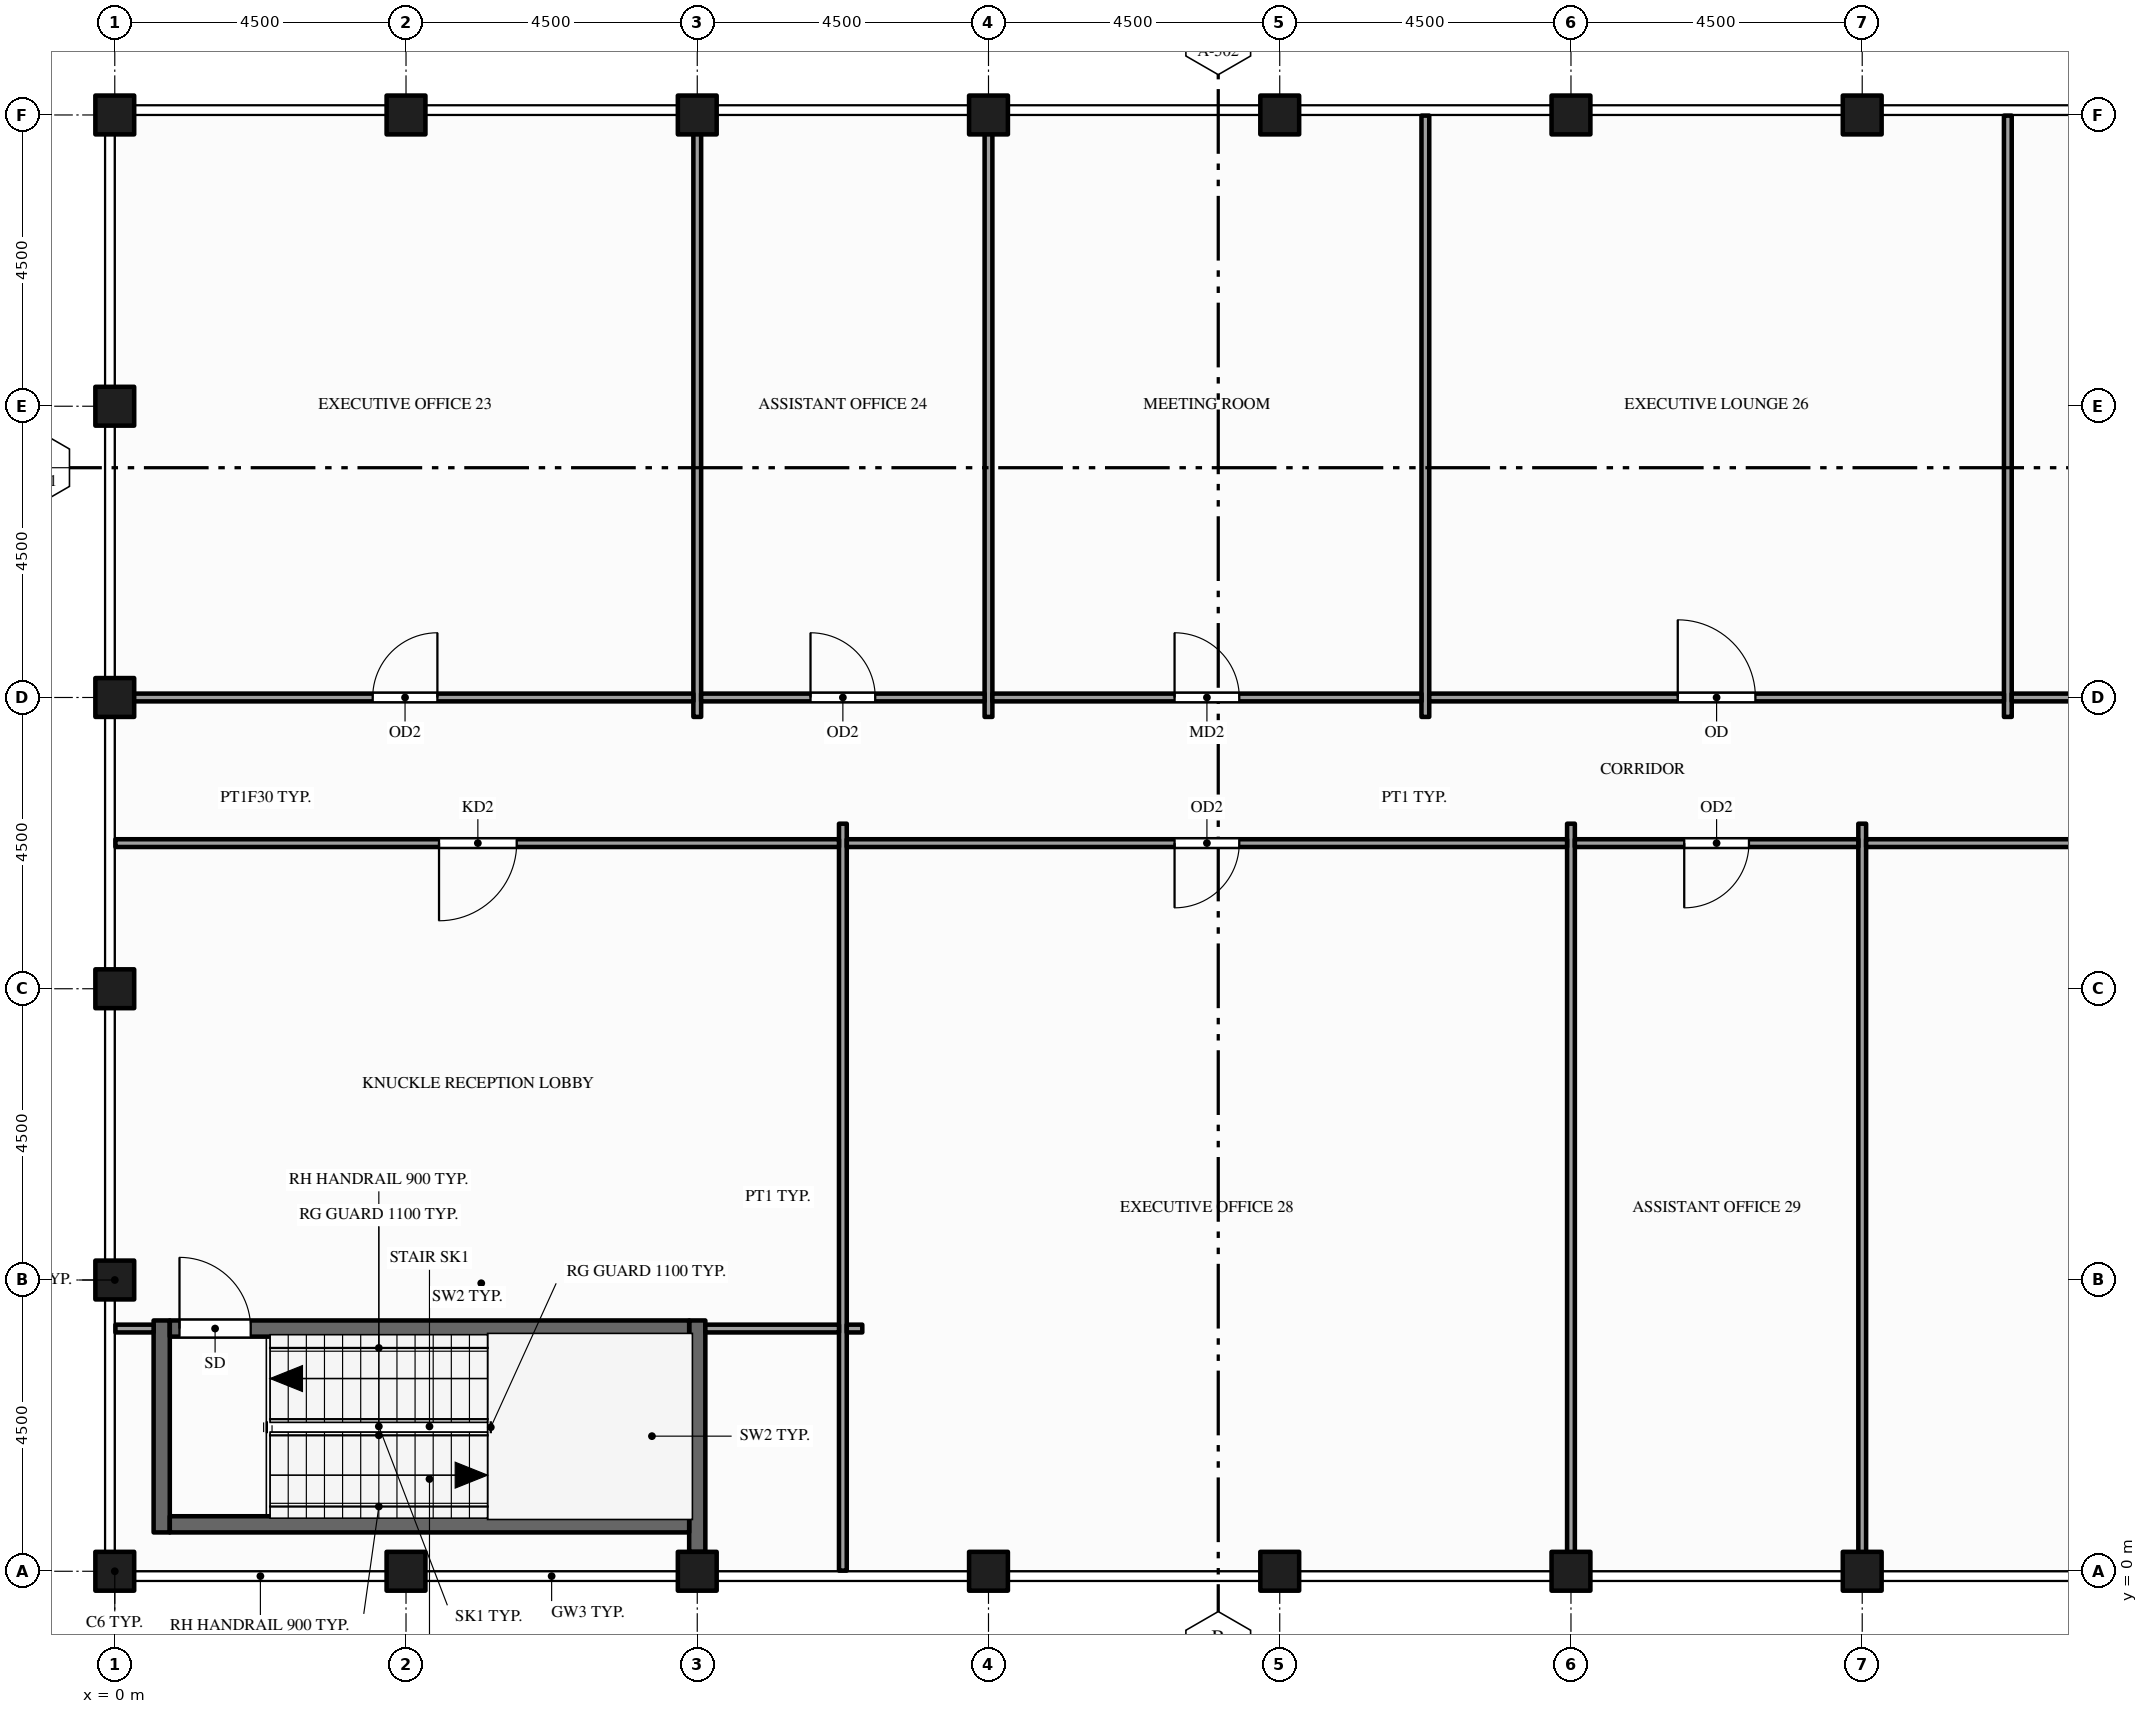
"""IFC4 building model, lengths in metres.
Left out: names, types, materials, properties, quantities, classifications, styles, units other than length and angle.
Written with IfcOpenShell. Run it as: python <this file> out.ifc"""

import sys

from ifc_helpers import new_model, si_unit, direction, frame, frame_2d, origin, origin_2d, place, context, subcontext, project, spatial, rectangle, hollow_rectangle, extrude, element, fill, save


model = new_model("IFC4")
c1 = context("Model", 3, precision=1e-05, world=origin(), true_north=direction((0.0, 1.0)))
c2 = subcontext(c1, "Body", "Model", "MODEL_VIEW")
j1 = project(units=[si_unit("LENGTHUNIT", "METRE"), si_unit("PLANEANGLEUNIT", "RADIAN")], contexts=[c1])
p1 = place(None, origin())
s1 = spatial("IfcSite", under=j1, at=p1, CompositionType="ELEMENT")
p2 = place(p1, origin())
s2 = spatial("IfcBuilding", under=s1, at=p2, CompositionType="ELEMENT")
p3 = place(p2, frame((0.0, 0.0, 323.0)))
s3 = spatial("IfcBuildingStorey", under=s2, at=p3, CompositionType="ELEMENT", Elevation=323.0)
for number, where, z_axis, x_axis in (
    (1, (0.0, 0.0, -0.15), (0.0, 0.0, 1.0), (1.0, 0.0, 0.0)),
    (2, (0.0, 4.5, -0.15), (0.0, 0.0, 1.0), (1.0, 0.0, 0.0)),
    (3, (0.0, 9.0, -0.15), (0.0, 0.0, 1.0), (1.0, 0.0, 0.0)),
    (4, (0.0, 13.5, -0.15), (0.0, 0.0, 1.0), (1.0, 0.0, 0.0)),
    (5, (0.0, 18.0, -0.15), (0.0, 0.0, 1.0), (1.0, 0.0, 0.0)),
    (6, (0.0, 22.5, -0.15), (0.0, 0.0, 1.0), (1.0, 0.0, 0.0)),
    (7, (4.5, 0.0, -0.15), (0.0, 0.0, 1.0), (1.0, 0.0, 0.0)),
    (8, (4.5, 22.5, -0.15), (0.0, 0.0, 1.0), (1.0, 0.0, 0.0)),
    (9, (9.0, 0.0, -0.15), (0.0, 0.0, 1.0), (1.0, 0.0, 0.0)),
    (10, (9.0, 22.5, -0.15), (0.0, 0.0, 1.0), (1.0, 0.0, 0.0)),
    (11, (13.5, 0.0, -0.15), (0.0, 0.0, 1.0), (1.0, 0.0, 0.0)),
    (12, (13.5, 22.5, -0.15), (0.0, 0.0, 1.0), (1.0, 0.0, 0.0)),
    (13, (18.0, 0.0, -0.15), (0.0, 0.0, 1.0), (1.0, 0.0, 0.0)),
    (14, (18.0, 22.5, -0.15), (0.0, 0.0, 1.0), (1.0, 0.0, 0.0)),
    (15, (22.5, 0.0, -0.15), (0.0, 0.0, 1.0), (1.0, 0.0, 0.0)),
    (16, (22.5, 22.5, -0.15), (0.0, 0.0, 1.0), (1.0, 0.0, 0.0)),
    (17, (27.0, 0.0, -0.15), (0.0, 0.0, 1.0), (1.0, 0.0, 0.0)),
    (18, (27.0, 22.5, -0.15), (0.0, 0.0, 1.0), (1.0, 0.0, 0.0)),
):
    element("IfcColumn", number, at=place(p3, frame(where, z_axis=z_axis, x_axis=x_axis)), inside=s3, PredefinedType="COLUMN", context=c2, shape_type="SweptSolid", body=[
        extrude(hollow_rectangle(XDim=0.6, YDim=0.6, WallThickness=0.03, at=origin_2d()), origin(), (0.0, 0.0, 1.0), 4.5),
    ])
p4 = place(p3, frame((0.725, 0.6, 0.0), z_axis=(0.0, 0.0, 1.0), x_axis=(0.0, 1.0, 0.0)))
e19 = element("IfcWall", 19, at=p4, inside=s3, PredefinedType="SHEAR", context=c2, shape_type="SweptSolid", body=[
    extrude(rectangle(XDim=3.275, YDim=0.25, at=frame_2d((1.637, 0.0))), origin(), (0.0, 0.0, 1.0), 4.35),
])
p5 = place(p3, frame((9.0, 0.3, 0.0), z_axis=(0.0, 0.0, 1.0), x_axis=(0.0, 1.0, 0.0)))
e20 = element("IfcWall", 20, at=p5, inside=s3, PredefinedType="SHEAR", context=c2, shape_type="SweptSolid", body=[
    extrude(rectangle(XDim=3.575, YDim=0.25, at=frame_2d((1.788, 0.0))), origin(), (0.0, 0.0, 1.0), 4.35),
])
p6 = place(p3, frame((9.0, 13.2, 0.0), z_axis=(0.0, 0.0, 1.0), x_axis=(0.0, 1.0, 0.0)))
e21 = element("IfcWall", 21, at=p6, inside=s3, PredefinedType="PARTITIONING", context=c2, shape_type="SweptSolid", body=[
    extrude(rectangle(XDim=9.29, YDim=0.12, at=frame_2d((4.645, 0.0))), origin(), (0.0, 0.0, 1.0), 3.359),
])
p7 = place(p3, frame((11.25, 0.01, 0.0), z_axis=(0.0, 0.0, 1.0), x_axis=(0.0, 1.0, 0.0)))
e22 = element("IfcWall", 22, at=p7, inside=s3, PredefinedType="PARTITIONING", context=c2, shape_type="SweptSolid", body=[
    extrude(rectangle(XDim=11.54, YDim=0.12, at=frame_2d((5.77, 0.0))), origin(), (0.0, 0.0, 1.0), 3.359),
])
for number, where, z_axis, x_axis in (
    (23, (13.5, 13.2, 0.0), (0.0, 0.0, 1.0), (0.0, 1.0, 0.0)),
    (24, (20.25, 13.2, 0.0), (0.0, 0.0, 1.0), (0.0, 1.0, 0.0)),
):
    element("IfcWall", number, at=place(p3, frame(where, z_axis=z_axis, x_axis=x_axis)), inside=s3, PredefinedType="PARTITIONING", context=c2, shape_type="SweptSolid", body=[
        extrude(rectangle(XDim=9.29, YDim=0.12, at=frame_2d((4.645, 0.0))), origin(), (0.0, 0.0, 1.0), 3.359),
    ])
for number, where, z_axis, x_axis in (
    (25, (22.5, 0.01, 0.0), (0.0, 0.0, 1.0), (0.0, 1.0, 0.0)),
    (26, (27.0, 0.01, 0.0), (0.0, 0.0, 1.0), (0.0, 1.0, 0.0)),
):
    element("IfcWall", number, at=place(p3, frame(where, z_axis=z_axis, x_axis=x_axis)), inside=s3, PredefinedType="PARTITIONING", context=c2, shape_type="SweptSolid", body=[
        extrude(rectangle(XDim=11.54, YDim=0.12, at=frame_2d((5.77, 0.0))), origin(), (0.0, 0.0, 1.0), 3.359),
    ])
p8 = place(p3, frame((29.25, 13.2, 0.0), z_axis=(0.0, 0.0, 1.0), x_axis=(0.0, 1.0, 0.0)))
e27 = element("IfcWall", 27, at=p8, inside=s3, PredefinedType="PARTITIONING", context=c2, shape_type="SweptSolid", body=[
    extrude(rectangle(XDim=9.29, YDim=0.12, at=frame_2d((4.645, 0.0))), origin(), (0.0, 0.0, 1.0), 3.359),
])
p9 = place(p3, frame((0.85, 0.725, 0.0), z_axis=(0.0, 0.0, 1.0), x_axis=(1.0, 0.0, 0.0)))
e28 = element("IfcWall", 28, at=p9, inside=s3, PredefinedType="SHEAR", context=c2, shape_type="SweptSolid", body=[
    extrude(rectangle(XDim=8.025, YDim=0.25, at=frame_2d((4.012, 0.0))), origin(), (0.0, 0.0, 1.0), 4.35),
])
p10 = place(p3, frame((0.01, 3.75, 0.0), z_axis=(0.0, 0.0, 1.0), x_axis=(1.0, 0.0, 0.0)))
e29 = element("IfcWall", 29, at=p10, inside=s3, PredefinedType="PARTITIONING", context=c2, shape_type="SweptSolid", body=[
    extrude(rectangle(XDim=0.59, YDim=0.12, at=frame_2d((0.295, 0.0))), origin(), (0.0, 0.0, 1.0), 3.672),
])
p11 = place(p3, frame((0.85, 3.75, 0.0), z_axis=(0.0, 0.0, 1.0), x_axis=(1.0, 0.0, 0.0)))
e30 = element("IfcWall", 30, at=p11, inside=s3, PredefinedType="SHEAR", context=c2, shape_type="SweptSolid", body=[
    extrude(rectangle(XDim=8.025, YDim=0.25, at=frame_2d((4.012, 0.0))), origin(), (0.0, 0.0, 1.0), 4.35),
])
p12 = place(p11, frame((0.15, 0.0, 0.0)))
e31 = element("IfcOpeningElement", 31, at=p12, cuts=e30, PredefinedType="OPENING", context=c2, shape_type="SweptSolid", body=[
    extrude(rectangle(XDim=1.1, YDim=2.1, at=frame_2d((0.55, 1.05))), frame((0.0, 0.135, 0.0), z_axis=(0.0, -1.0, 0.0), x_axis=(1.0, 0.0, 0.0)), (0.0, 0.0, 1.0), 0.27),
])
p13 = place(p3, frame((9.125, 3.75, 0.0), z_axis=(0.0, 0.0, 1.0), x_axis=(1.0, 0.0, 0.0)))
e32 = element("IfcWall", 32, at=p13, inside=s3, PredefinedType="PARTITIONING", context=c2, shape_type="SweptSolid", body=[
    extrude(rectangle(XDim=2.065, YDim=0.12, at=frame_2d((1.032, 0.0))), origin(), (0.0, 0.0, 1.0), 3.359),
])
p14 = place(p3, frame((11.31, 3.75, 0.0), z_axis=(0.0, 0.0, 1.0), x_axis=(1.0, 0.0, 0.0)))
e33 = element("IfcWall", 33, at=p14, inside=s3, PredefinedType="PARTITIONING", context=c2, shape_type="SweptSolid", body=[
    extrude(rectangle(XDim=0.24, YDim=0.12, at=frame_2d((0.12, 0.0))), origin(), (0.0, 0.0, 1.0), 3.359),
])
p15 = place(p3, frame((0.01, 11.25, 0.0), z_axis=(0.0, 0.0, 1.0), x_axis=(1.0, 0.0, 0.0)))
e34 = element("IfcWall", 34, at=p15, inside=s3, PredefinedType="PARTITIONING", context=c2, shape_type="SweptSolid", body=[
    extrude(rectangle(XDim=11.18, YDim=0.12, at=frame_2d((5.59, 0.0))), origin(), (0.0, 0.0, 1.0), 3.359),
])
p16 = place(p15, frame((5.0, 0.0, 0.0)))
e35 = element("IfcOpeningElement", 35, at=p16, cuts=e34, PredefinedType="OPENING", context=c2, shape_type="SweptSolid", body=[
    extrude(rectangle(XDim=1.2, YDim=2.1, at=frame_2d((0.6, 1.05))), frame((0.0, 0.07, 0.0), z_axis=(0.0, -1.0, 0.0), x_axis=(1.0, 0.0, 0.0)), (0.0, 0.0, 1.0), 0.14),
])
p17 = place(p3, frame((11.31, 11.25, 0.0), z_axis=(0.0, 0.0, 1.0), x_axis=(1.0, 0.0, 0.0)))
e36 = element("IfcWall", 36, at=p17, inside=s3, PredefinedType="PARTITIONING", context=c2, shape_type="SweptSolid", body=[
    extrude(rectangle(XDim=11.13, YDim=0.12, at=frame_2d((5.565, 0.0))), origin(), (0.0, 0.0, 1.0), 3.359),
])
p18 = place(p17, frame((5.065, 0.0, 0.0)))
e37 = element("IfcOpeningElement", 37, at=p18, cuts=e36, PredefinedType="OPENING", context=c2, shape_type="SweptSolid", body=[
    extrude(rectangle(XDim=1.0, YDim=2.1, at=frame_2d((0.5, 1.05))), frame((0.0, 0.07, 0.0), z_axis=(0.0, -1.0, 0.0), x_axis=(1.0, 0.0, 0.0)), (0.0, 0.0, 1.0), 0.14),
])
p19 = place(p3, frame((22.56, 11.25, 0.0), z_axis=(0.0, 0.0, 1.0), x_axis=(1.0, 0.0, 0.0)))
e38 = element("IfcWall", 38, at=p19, inside=s3, PredefinedType="PARTITIONING", context=c2, shape_type="SweptSolid", body=[
    extrude(rectangle(XDim=4.38, YDim=0.12, at=frame_2d((2.19, 0.0))), origin(), (0.0, 0.0, 1.0), 3.359),
])
p20 = place(p19, frame((1.69, 0.0, 0.0)))
e39 = element("IfcOpeningElement", 39, at=p20, cuts=e38, PredefinedType="OPENING", context=c2, shape_type="SweptSolid", body=[
    extrude(rectangle(XDim=1.0, YDim=2.1, at=frame_2d((0.5, 1.05))), frame((0.0, 0.07, 0.0), z_axis=(0.0, -1.0, 0.0), x_axis=(1.0, 0.0, 0.0)), (0.0, 0.0, 1.0), 0.14),
])
p21 = place(p3, frame((27.06, 11.25, 0.0), z_axis=(0.0, 0.0, 1.0), x_axis=(1.0, 0.0, 0.0)))
e40 = element("IfcWall", 40, at=p21, inside=s3, PredefinedType="PARTITIONING", context=c2, shape_type="SweptSolid", body=[
    extrude(rectangle(XDim=11.13, YDim=0.12, at=frame_2d((5.565, 0.0))), origin(), (0.0, 0.0, 1.0), 3.359),
])
p22 = place(p21, frame((4.965, 0.0, 0.0)))
e41 = element("IfcOpeningElement", 41, at=p22, cuts=e40, PredefinedType="OPENING", context=c2, shape_type="SweptSolid", body=[
    extrude(rectangle(XDim=1.2, YDim=2.1, at=frame_2d((0.6, 1.05))), frame((0.0, 0.07, 0.0), z_axis=(0.0, -1.0, 0.0), x_axis=(1.0, 0.0, 0.0)), (0.0, 0.0, 1.0), 0.14),
])
p23 = place(p3, frame((0.01, 13.5, 0.0), z_axis=(0.0, 0.0, 1.0), x_axis=(1.0, 0.0, 0.0)))
e42 = element("IfcWall", 42, at=p23, inside=s3, PredefinedType="PARTITIONING", context=c2, shape_type="SweptSolid", body=[
    extrude(rectangle(XDim=8.93, YDim=0.12, at=frame_2d((4.465, 0.0))), origin(), (0.0, 0.0, 1.0), 3.359),
])
p24 = place(p23, frame((3.975, 0.0, 0.0)))
e43 = element("IfcOpeningElement", 43, at=p24, cuts=e42, PredefinedType="OPENING", context=c2, shape_type="SweptSolid", body=[
    extrude(rectangle(XDim=1.0, YDim=2.1, at=frame_2d((0.5, 1.05))), frame((0.0, 0.07, 0.0), z_axis=(0.0, -1.0, 0.0), x_axis=(1.0, 0.0, 0.0)), (0.0, 0.0, 1.0), 0.14),
])
p25 = place(p3, frame((9.06, 13.5, 0.0), z_axis=(0.0, 0.0, 1.0), x_axis=(1.0, 0.0, 0.0)))
e44 = element("IfcWall", 44, at=p25, inside=s3, PredefinedType="PARTITIONING", context=c2, shape_type="SweptSolid", body=[
    extrude(rectangle(XDim=4.38, YDim=0.12, at=frame_2d((2.19, 0.0))), origin(), (0.0, 0.0, 1.0), 3.359),
])
p26 = place(p25, frame((1.69, 0.0, 0.0)))
e45 = element("IfcOpeningElement", 45, at=p26, cuts=e44, PredefinedType="OPENING", context=c2, shape_type="SweptSolid", body=[
    extrude(rectangle(XDim=1.0, YDim=2.1, at=frame_2d((0.5, 1.05))), frame((0.0, 0.07, 0.0), z_axis=(0.0, -1.0, 0.0), x_axis=(1.0, 0.0, 0.0)), (0.0, 0.0, 1.0), 0.14),
])
p27 = place(p3, frame((13.56, 13.5, 0.0), z_axis=(0.0, 0.0, 1.0), x_axis=(1.0, 0.0, 0.0)))
e46 = element("IfcWall", 46, at=p27, inside=s3, PredefinedType="PARTITIONING", context=c2, shape_type="SweptSolid", body=[
    extrude(rectangle(XDim=6.63, YDim=0.12, at=frame_2d((3.315, 0.0))), origin(), (0.0, 0.0, 1.0), 3.359),
])
p28 = place(p27, frame((2.815, 0.0, 0.0)))
e47 = element("IfcOpeningElement", 47, at=p28, cuts=e46, PredefinedType="OPENING", context=c2, shape_type="SweptSolid", body=[
    extrude(rectangle(XDim=1.0, YDim=2.1, at=frame_2d((0.5, 1.05))), frame((0.0, 0.07, 0.0), z_axis=(0.0, -1.0, 0.0), x_axis=(1.0, 0.0, 0.0)), (0.0, 0.0, 1.0), 0.14),
])
p29 = place(p3, frame((20.31, 13.5, 0.0), z_axis=(0.0, 0.0, 1.0), x_axis=(1.0, 0.0, 0.0)))
e48 = element("IfcWall", 48, at=p29, inside=s3, PredefinedType="PARTITIONING", context=c2, shape_type="SweptSolid", body=[
    extrude(rectangle(XDim=8.88, YDim=0.12, at=frame_2d((4.44, 0.0))), origin(), (0.0, 0.0, 1.0), 3.359),
])
p30 = place(p29, frame((3.84, 0.0, 0.0)))
e49 = element("IfcOpeningElement", 49, at=p30, cuts=e48, PredefinedType="OPENING", context=c2, shape_type="SweptSolid", body=[
    extrude(rectangle(XDim=1.2, YDim=2.1, at=frame_2d((0.6, 1.05))), frame((0.0, 0.07, 0.0), z_axis=(0.0, -1.0, 0.0), x_axis=(1.0, 0.0, 0.0)), (0.0, 0.0, 1.0), 0.14),
])
p31 = place(p3, frame((29.31, 13.5, 0.0), z_axis=(0.0, 0.0, 1.0), x_axis=(1.0, 0.0, 0.0)))
e50 = element("IfcWall", 50, at=p31, inside=s3, PredefinedType="PARTITIONING", context=c2, shape_type="SweptSolid", body=[
    extrude(rectangle(XDim=13.38, YDim=0.12, at=frame_2d((6.69, 0.0))), origin(), (0.0, 0.0, 1.0), 3.359),
])
p32 = place(p31, frame((6.09, 0.0, 0.0)))
e51 = element("IfcOpeningElement", 51, at=p32, cuts=e50, PredefinedType="OPENING", context=c2, shape_type="SweptSolid", body=[
    extrude(rectangle(XDim=1.2, YDim=2.1, at=frame_2d((0.6, 1.05))), frame((0.0, 0.07, 0.0), z_axis=(0.0, -1.0, 0.0), x_axis=(1.0, 0.0, 0.0)), (0.0, 0.0, 1.0), 0.14),
])
p33 = place(p12, origin())
e52 = element("IfcDoor", 52, at=p33, inside=s3, OperationType="SINGLE_SWING_LEFT", PredefinedType="DOOR", context=c2, shape_type="SweptSolid", body=[
    extrude(rectangle(XDim=1.1, YDim=2.1, at=frame_2d((0.55, 1.05))), frame((0.0, 0.025, 0.0), z_axis=(0.0, -1.0, 0.0), x_axis=(1.0, 0.0, 0.0)), (0.0, 0.0, 1.0), 0.05),
])
fill(e31, e52)
p34 = place(p16, origin())
e53 = element("IfcDoor", 53, at=p34, inside=s3, OperationType="SINGLE_SWING_LEFT", PredefinedType="DOOR", context=c2, shape_type="SweptSolid", body=[
    extrude(rectangle(XDim=1.2, YDim=2.1, at=frame_2d((0.6, 1.05))), frame((0.0, 0.025, 0.0), z_axis=(0.0, -1.0, 0.0), x_axis=(1.0, 0.0, 0.0)), (0.0, 0.0, 1.0), 0.05),
])
fill(e35, e53)
p35 = place(p18, origin())
e54 = element("IfcDoor", 54, at=p35, inside=s3, OperationType="SINGLE_SWING_LEFT", PredefinedType="DOOR", context=c2, shape_type="SweptSolid", body=[
    extrude(rectangle(XDim=1.0, YDim=2.1, at=frame_2d((0.5, 1.05))), frame((0.0, 0.025, 0.0), z_axis=(0.0, -1.0, 0.0), x_axis=(1.0, 0.0, 0.0)), (0.0, 0.0, 1.0), 0.05),
])
fill(e37, e54)
p36 = place(p20, origin())
e55 = element("IfcDoor", 55, at=p36, inside=s3, OperationType="SINGLE_SWING_LEFT", PredefinedType="DOOR", context=c2, shape_type="SweptSolid", body=[
    extrude(rectangle(XDim=1.0, YDim=2.1, at=frame_2d((0.5, 1.05))), frame((0.0, 0.025, 0.0), z_axis=(0.0, -1.0, 0.0), x_axis=(1.0, 0.0, 0.0)), (0.0, 0.0, 1.0), 0.05),
])
fill(e39, e55)
p37 = place(p24, origin())
e56 = element("IfcDoor", 56, at=p37, inside=s3, OperationType="SINGLE_SWING_RIGHT", PredefinedType="DOOR", context=c2, shape_type="SweptSolid", body=[
    extrude(rectangle(XDim=1.0, YDim=2.1, at=frame_2d((0.5, 1.05))), frame((0.0, 0.025, 0.0), z_axis=(0.0, -1.0, 0.0), x_axis=(1.0, 0.0, 0.0)), (0.0, 0.0, 1.0), 0.05),
])
fill(e43, e56)
p38 = place(p26, origin())
e57 = element("IfcDoor", 57, at=p38, inside=s3, OperationType="SINGLE_SWING_LEFT", PredefinedType="DOOR", context=c2, shape_type="SweptSolid", body=[
    extrude(rectangle(XDim=1.0, YDim=2.1, at=frame_2d((0.5, 1.05))), frame((0.0, 0.025, 0.0), z_axis=(0.0, -1.0, 0.0), x_axis=(1.0, 0.0, 0.0)), (0.0, 0.0, 1.0), 0.05),
])
fill(e45, e57)
p39 = place(p28, origin())
e58 = element("IfcDoor", 58, at=p39, inside=s3, OperationType="SINGLE_SWING_LEFT", PredefinedType="DOOR", context=c2, shape_type="SweptSolid", body=[
    extrude(rectangle(XDim=1.0, YDim=2.1, at=frame_2d((0.5, 1.05))), frame((0.0, 0.025, 0.0), z_axis=(0.0, -1.0, 0.0), x_axis=(1.0, 0.0, 0.0)), (0.0, 0.0, 1.0), 0.05),
])
fill(e47, e58)
p40 = place(p30, origin())
e59 = element("IfcDoor", 59, at=p40, inside=s3, OperationType="SINGLE_SWING_LEFT", PredefinedType="DOOR", context=c2, shape_type="SweptSolid", body=[
    extrude(rectangle(XDim=1.2, YDim=2.1, at=frame_2d((0.6, 1.05))), frame((0.0, 0.025, 0.0), z_axis=(0.0, -1.0, 0.0), x_axis=(1.0, 0.0, 0.0)), (0.0, 0.0, 1.0), 0.05),
])
fill(e49, e59)
save(model, sys.argv[1])
